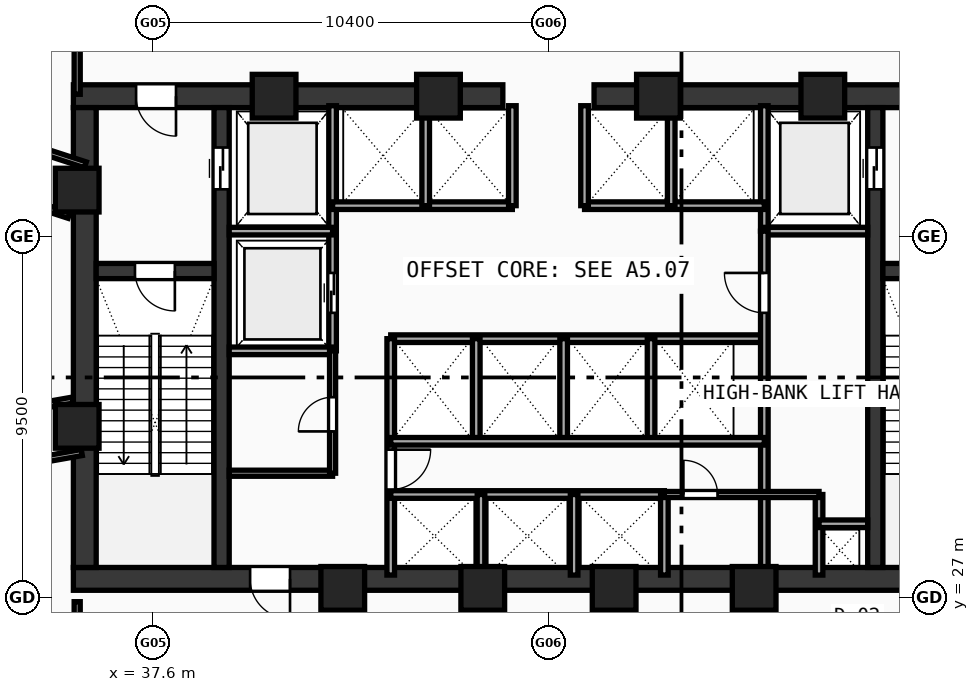
"""IFC4 building model, lengths in metres.
Left out: names, types, materials, properties, quantities, classifications, styles, units other than length and angle.
Written with IfcOpenShell. Run it as: python <this file> out.ifc"""

import sys

from ifc_helpers import new_model, si_unit, direction, frame, frame_2d, origin, origin_with_axes, origin_2d, place, context, subcontext, project, spatial, rectangle, hollow_rectangle, extrude, source, transform, mapped, element, fill, save


model = new_model("IFC4")
c1 = context("Model", 3, precision=1e-05, world=origin(), true_north=direction((0.0, 1.0)))
c2 = subcontext(c1, "Body", "Model", "MODEL_VIEW")
j1 = project(units=[si_unit("LENGTHUNIT", "METRE"), si_unit("PLANEANGLEUNIT", "RADIAN")], contexts=[c1])
p1 = place(None, origin())
s1 = spatial("IfcSite", under=j1, at=p1, CompositionType="ELEMENT")
p2 = place(p1, origin())
s2 = spatial("IfcBuilding", under=s1, at=p2, CompositionType="ELEMENT")
p3 = place(p2, frame((0.0, 0.0, 76.38)))
s3 = spatial("IfcBuildingStorey", under=s2, at=p3, CompositionType="ELEMENT", Elevation=76.38)
p4 = place(p3, frame((35.5, 27.5, 0.0), z_axis=(0.0, 0.0, 1.0), x_axis=(1.0, 0.0, 0.0)))
e1 = element("IfcWall", 1, at=p4, inside=s3, PredefinedType="SHEAR", context=c2, shape_type="SweptSolid", body=[
    extrude(rectangle(XDim=25.0, YDim=0.6, at=frame_2d((12.5, 0.0))), origin(), (0.0, 0.0, 1.0), 4.54),
])
p5 = place(p4, frame((4.65, 0.0, 0.0)))
e2 = element("IfcOpeningElement", 2, at=p5, cuts=e1, PredefinedType="OPENING", context=c2, shape_type="SweptSolid", body=[
    extrude(rectangle(XDim=1.05, YDim=2.1, at=frame_2d((0.525, 1.05))), frame((0.0, 0.31, 0.0), z_axis=(0.0, -1.0, 0.0), x_axis=(1.0, 0.0, 0.0)), (0.0, 0.0, 1.0), 0.62),
])
p6 = place(p3, frame((35.5, 40.2, 0.0), z_axis=(0.0, 0.0, 1.0), x_axis=(1.0, 0.0, 0.0)))
e3 = element("IfcWall", 3, at=p6, inside=s3, PredefinedType="SHEAR", context=c2, shape_type="SweptSolid", body=[
    extrude(rectangle(XDim=11.3, YDim=0.6, at=frame_2d((5.65, 0.0))), origin(), (0.0, 0.0, 1.0), 4.54),
])
p7 = place(p6, frame((1.65, 0.0, 0.0)))
e4 = element("IfcOpeningElement", 4, at=p7, cuts=e3, PredefinedType="OPENING", context=c2, shape_type="SweptSolid", body=[
    extrude(rectangle(XDim=1.05, YDim=2.1, at=frame_2d((0.525, 1.05))), frame((0.0, 0.31, 0.0), z_axis=(0.0, -1.0, 0.0), x_axis=(1.0, 0.0, 0.0)), (0.0, 0.0, 1.0), 0.62),
])
p8 = place(p3, frame((49.2, 40.2, 0.0), z_axis=(0.0, 0.0, 1.0), x_axis=(1.0, 0.0, 0.0)))
e5 = element("IfcWall", 5, at=p8, inside=s3, PredefinedType="SHEAR", context=c2, shape_type="SweptSolid", body=[
    extrude(rectangle(XDim=11.3, YDim=0.6, at=frame_2d((5.65, 0.0))), origin(), (0.0, 0.0, 1.0), 4.54),
])
p9 = place(p8, frame((8.6, 0.0, 0.0)))
e6 = element("IfcOpeningElement", 6, at=p9, cuts=e5, PredefinedType="OPENING", context=c2, shape_type="SweptSolid", body=[
    extrude(rectangle(XDim=1.05, YDim=2.1, at=frame_2d((0.525, 1.05))), frame((0.0, 0.31, 0.0), z_axis=(0.0, -1.0, 0.0), x_axis=(1.0, 0.0, 0.0)), (0.0, 0.0, 1.0), 0.62),
])
p10 = place(p3, frame((35.8, 27.8, 0.0), z_axis=(0.0, 0.0, 1.0), x_axis=(0.0, 1.0, 0.0)))
e7 = element("IfcWall", 7, at=p10, inside=s3, PredefinedType="SHEAR", context=c2, shape_type="SweptSolid", body=[
    extrude(rectangle(XDim=12.1, YDim=0.6, at=frame_2d((6.05, 0.0))), origin(), (0.0, 0.0, 1.0), 4.54),
])
p11 = place(p3, frame((39.4, 27.8, 0.0), z_axis=(0.0, 0.0, 1.0), x_axis=(0.0, 1.0, 0.0)))
e8 = element("IfcWall", 8, at=p11, inside=s3, PredefinedType="SHEAR", context=c2, shape_type="SweptSolid", body=[
    extrude(rectangle(XDim=12.1, YDim=0.4, at=frame_2d((6.05, 0.0))), origin(), (0.0, 0.0, 1.0), 4.54),
])
p12 = place(p11, frame((9.95, 0.0, 0.0)))
e9 = element("IfcOpeningElement", 9, at=p12, cuts=e8, PredefinedType="OPENING", context=c2, shape_type="SweptSolid", body=[
    extrude(rectangle(XDim=1.1, YDim=2.1, at=frame_2d((0.55, 1.05))), frame((0.0, 0.21, 0.0), z_axis=(0.0, -1.0, 0.0), x_axis=(1.0, 0.0, 0.0)), (0.0, 0.0, 1.0), 0.42),
])
p13 = place(p3, frame((56.6, 27.8, 0.0), z_axis=(0.0, 0.0, 1.0), x_axis=(0.0, 1.0, 0.0)))
e10 = element("IfcWall", 10, at=p13, inside=s3, PredefinedType="SHEAR", context=c2, shape_type="SweptSolid", body=[
    extrude(rectangle(XDim=12.1, YDim=0.4, at=frame_2d((6.05, 0.0))), origin(), (0.0, 0.0, 1.0), 4.54),
])
p14 = place(p13, frame((9.95, 0.0, 0.0)))
e11 = element("IfcOpeningElement", 11, at=p14, cuts=e10, PredefinedType="OPENING", context=c2, shape_type="SweptSolid", body=[
    extrude(rectangle(XDim=1.1, YDim=2.1, at=frame_2d((0.55, 1.05))), frame((0.0, 0.21, 0.0), z_axis=(0.0, -1.0, 0.0), x_axis=(1.0, 0.0, 0.0)), (0.0, 0.0, 1.0), 0.42),
])
p15 = place(p3, frame((36.1, 35.6, 0.0), z_axis=(0.0, 0.0, 1.0), x_axis=(1.0, 0.0, 0.0)))
e12 = element("IfcWall", 12, at=p15, inside=s3, PredefinedType="SHEAR", context=c2, shape_type="SweptSolid", body=[
    extrude(rectangle(XDim=3.1, YDim=0.4, at=frame_2d((1.55, 0.0))), origin(), (0.0, 0.0, 1.0), 4.54),
])
p16 = place(p15, frame((1.02, 0.0, 0.0)))
e13 = element("IfcOpeningElement", 13, at=p16, cuts=e12, PredefinedType="OPENING", context=c2, shape_type="SweptSolid", body=[
    extrude(rectangle(XDim=1.05, YDim=2.1, at=frame_2d((0.525, 1.05))), frame((0.0, 0.21, 0.0), z_axis=(0.0, -1.0, 0.0), x_axis=(1.0, 0.0, 0.0)), (0.0, 0.0, 1.0), 0.42),
])
p17 = place(p3, frame((56.8, 35.6, 0.0), z_axis=(0.0, 0.0, 1.0), x_axis=(1.0, 0.0, 0.0)))
e14 = element("IfcWall", 14, at=p17, inside=s3, PredefinedType="SHEAR", context=c2, shape_type="SweptSolid", body=[
    extrude(rectangle(XDim=3.1, YDim=0.4, at=frame_2d((1.55, 0.0))), origin(), (0.0, 0.0, 1.0), 4.54),
])
p18 = place(p17, frame((1.02, 0.0, 0.0)))
e15 = element("IfcOpeningElement", 15, at=p18, cuts=e14, PredefinedType="OPENING", context=c2, shape_type="SweptSolid", body=[
    extrude(rectangle(XDim=1.05, YDim=2.1, at=frame_2d((0.525, 1.05))), frame((0.0, 0.21, 0.0), z_axis=(0.0, -1.0, 0.0), x_axis=(1.0, 0.0, 0.0)), (0.0, 0.0, 1.0), 0.42),
])
m1 = source(origin(), c2, "Body", "SweptSolid", [
    extrude(hollow_rectangle(XDim=1.15, YDim=1.15, WallThickness=0.048, at=origin_2d()), origin(), (0.0, 0.0, 1.0), 4.82),
])
for number, where, z_axis, x_axis in (
    (16, (42.588, 27.25, -0.28), (0.0, 0.0, 1.0), (1.0, 0.0, 0.0)),
    (17, (46.272, 27.25, -0.28), (0.0, 0.0, 1.0), (1.0, 0.0, 0.0)),
    (18, (49.729, 27.25, -0.28), (0.0, 0.0, 1.0), (1.0, 0.0, 0.0)),
    (19, (53.412, 27.25, -0.28), (0.0, 0.0, 1.0), (1.0, 0.0, 0.0)),
    (20, (55.219, 40.2, -0.28), (0.0, 0.0, 1.0), (1.0, 0.0, 0.0)),
    (21, (50.894, 40.2, -0.28), (0.0, 0.0, 1.0), (1.0, 0.0, 0.0)),
    (22, (45.106, 40.2, -0.28), (0.0, 0.0, 1.0), (1.0, 0.0, 0.0)),
    (23, (40.781, 40.2, -0.28), (0.0, 0.0, 1.0), (1.0, 0.0, 0.0)),
    (24, (35.6, 37.729, -0.28), (0.0, 0.0, 1.0), (1.0, 0.0, 0.0)),
    (25, (35.6, 31.513, -0.28), (0.0, 0.0, 1.0), (1.0, 0.0, 0.0)),
):
    element("IfcColumn", number, at=place(p3, frame(where, z_axis=z_axis, x_axis=x_axis)), inside=s3, PredefinedType="COLUMN", context=c2, shape_type="MappedRepresentation", body=[
        mapped(m1, transform((0.0, 0.0, 0.0), scale=1.0)),
    ])
p19 = place(p3, frame((42.32, 33.5, 0.0), z_axis=(0.0, 0.0, 1.0), x_axis=(0.0, 1.0, 0.0)))
e26 = element("IfcWall", 26, at=p19, inside=s3, PredefinedType="SOLIDWALL", context=c2, shape_type="SweptSolid", body=[
    extrude(rectangle(XDim=6.45, YDim=0.2, at=frame_2d((3.225, 0.0))), origin(), (0.0, 0.0, 1.0), 4.54),
])
p20 = place(p19, frame((1.0, 0.0, 0.0)))
e27 = element("IfcOpeningElement", 27, at=p20, cuts=e26, PredefinedType="OPENING", context=c2, shape_type="SweptSolid", body=[
    extrude(rectangle(XDim=1.05, YDim=2.1, at=frame_2d((0.525, 1.05))), frame((0.0, 0.11, 0.0), z_axis=(0.0, -1.0, 0.0), x_axis=(1.0, 0.0, 0.0)), (0.0, 0.0, 1.0), 0.22),
])
for number, where, z_axis, x_axis in (
    (28, (39.6, 36.65, 0.0), (0.0, 0.0, 1.0), (1.0, 0.0, 0.0)),
    (29, (39.6, 33.5, 0.0), (0.0, 0.0, 1.0), (1.0, 0.0, 0.0)),
):
    element("IfcWall", number, at=place(p3, frame(where, z_axis=z_axis, x_axis=x_axis)), inside=s3, PredefinedType="SOLIDWALL", context=c2, shape_type="SweptSolid", body=[
        extrude(rectangle(XDim=2.72, YDim=0.2, at=frame_2d((1.36, 0.0))), origin(), (0.0, 0.0, 1.0), 4.54),
    ])
p21 = place(p3, frame((53.68, 36.65, 0.0), z_axis=(0.0, 0.0, 1.0), x_axis=(0.0, 1.0, 0.0)))
e30 = element("IfcWall", 30, at=p21, inside=s3, PredefinedType="SOLIDWALL", context=c2, shape_type="SweptSolid", body=[
    extrude(rectangle(XDim=3.3, YDim=0.2, at=frame_2d((1.65, 0.0))), origin(), (0.0, 0.0, 1.0), 4.54),
])
p22 = place(p3, frame((53.68, 36.65, 0.0), z_axis=(0.0, 0.0, 1.0), x_axis=(1.0, 0.0, 0.0)))
e31 = element("IfcWall", 31, at=p22, inside=s3, PredefinedType="SOLIDWALL", context=c2, shape_type="SweptSolid", body=[
    extrude(rectangle(XDim=2.72, YDim=0.2, at=frame_2d((1.36, 0.0))), origin(), (0.0, 0.0, 1.0), 4.54),
])
for number, where, z_axis, x_axis in (
    (32, (42.32, 37.32, 0.0), (0.0, 0.0, 1.0), (1.0, 0.0, 0.0)),
    (33, (48.95, 37.32, 0.0), (0.0, 0.0, 1.0), (1.0, 0.0, 0.0)),
):
    element("IfcWall", number, at=place(p3, frame(where, z_axis=z_axis, x_axis=x_axis)), inside=s3, PredefinedType="SOLIDWALL", context=c2, shape_type="SweptSolid", body=[
        extrude(rectangle(XDim=4.73, YDim=0.2, at=frame_2d((2.365, 0.0))), origin(), (0.0, 0.0, 1.0), 4.54),
    ])
for number, where, z_axis, x_axis in (
    (34, (47.05, 37.32, 0.0), (0.0, 0.0, 1.0), (0.0, 1.0, 0.0)),
    (35, (48.95, 37.32, 0.0), (0.0, 0.0, 1.0), (0.0, 1.0, 0.0)),
    (36, (44.77, 37.32, 0.0), (0.0, 0.0, 1.0), (0.0, 1.0, 0.0)),
    (37, (51.23, 37.32, 0.0), (0.0, 0.0, 1.0), (0.0, 1.0, 0.0)),
):
    element("IfcWall", number, at=place(p3, frame(where, z_axis=z_axis, x_axis=x_axis)), inside=s3, PredefinedType="SOLIDWALL", context=c2, shape_type="SweptSolid", body=[
        extrude(rectangle(XDim=2.63, YDim=0.2, at=frame_2d((1.315, 0.0))), origin(), (0.0, 0.0, 1.0), 4.54),
    ])
p23 = place(p3, frame((43.85, 33.82, 0.0), z_axis=(0.0, 0.0, 1.0), x_axis=(1.0, 0.0, 0.0)))
e38 = element("IfcWall", 38, at=p23, inside=s3, PredefinedType="SOLIDWALL", context=c2, shape_type="SweptSolid", body=[
    extrude(rectangle(XDim=9.83, YDim=0.2, at=frame_2d((4.915, 0.0))), origin(), (0.0, 0.0, 1.0), 4.54),
])
p24 = place(p3, frame((43.85, 27.6, 0.0), z_axis=(0.0, 0.0, 1.0), x_axis=(0.0, 1.0, 0.0)))
e39 = element("IfcWall", 39, at=p24, inside=s3, PredefinedType="SOLIDWALL", context=c2, shape_type="SweptSolid", body=[
    extrude(rectangle(XDim=6.22, YDim=0.2, at=frame_2d((3.11, 0.0))), origin(), (0.0, 0.0, 1.0), 4.54),
])
p25 = place(p24, frame((2.25, 0.0, 0.0)))
e40 = element("IfcOpeningElement", 40, at=p25, cuts=e39, PredefinedType="OPENING", context=c2, shape_type="SweptSolid", body=[
    extrude(rectangle(XDim=1.05, YDim=2.1, at=frame_2d((0.525, 1.05))), frame((0.0, 0.11, 0.0), z_axis=(0.0, -1.0, 0.0), x_axis=(1.0, 0.0, 0.0)), (0.0, 0.0, 1.0), 0.22),
])
p26 = place(p3, frame((53.68, 27.6, 0.0), z_axis=(0.0, 0.0, 1.0), x_axis=(0.0, 1.0, 0.0)))
e41 = element("IfcWall", 41, at=p26, inside=s3, PredefinedType="SOLIDWALL", context=c2, shape_type="SweptSolid", body=[
    extrude(rectangle(XDim=9.05, YDim=0.2, at=frame_2d((4.525, 0.0))), origin(), (0.0, 0.0, 1.0), 4.54),
])
p27 = place(p26, frame((6.9, 0.0, 0.0)))
e42 = element("IfcOpeningElement", 42, at=p27, cuts=e41, PredefinedType="OPENING", context=c2, shape_type="SweptSolid", body=[
    extrude(rectangle(XDim=1.05, YDim=2.1, at=frame_2d((0.525, 1.05))), frame((0.0, 0.11, 0.0), z_axis=(0.0, -1.0, 0.0), x_axis=(1.0, 0.0, 0.0)), (0.0, 0.0, 1.0), 0.22),
])
for number, where, z_axis, x_axis in (
    (43, (46.1, 31.12, 0.0), (0.0, 0.0, 1.0), (0.0, 1.0, 0.0)),
    (44, (48.4, 31.12, 0.0), (0.0, 0.0, 1.0), (0.0, 1.0, 0.0)),
    (45, (50.7, 31.12, 0.0), (0.0, 0.0, 1.0), (0.0, 1.0, 0.0)),
):
    element("IfcWall", number, at=place(p3, frame(where, z_axis=z_axis, x_axis=x_axis)), inside=s3, PredefinedType="SOLIDWALL", context=c2, shape_type="SweptSolid", body=[
        extrude(rectangle(XDim=2.7, YDim=0.2, at=frame_2d((1.35, 0.0))), origin(), (0.0, 0.0, 1.0), 4.54),
    ])
p28 = place(p3, frame((43.85, 29.72, 0.0), z_axis=(0.0, 0.0, 1.0), x_axis=(1.0, 0.0, 0.0)))
e46 = element("IfcWall", 46, at=p28, inside=s3, PredefinedType="SOLIDWALL", context=c2, shape_type="SweptSolid", body=[
    extrude(rectangle(XDim=7.2, YDim=0.2, at=frame_2d((3.6, 0.0))), origin(), (0.0, 0.0, 1.0), 4.54),
])
p29 = place(p3, frame((51.05, 27.6, 0.0), z_axis=(0.0, 0.0, 1.0), x_axis=(0.0, 1.0, 0.0)))
e47 = element("IfcWall", 47, at=p29, inside=s3, PredefinedType="SOLIDWALL", context=c2, shape_type="SweptSolid", body=[
    extrude(rectangle(XDim=2.12, YDim=0.2, at=frame_2d((1.06, 0.0))), origin(), (0.0, 0.0, 1.0), 4.54),
])
p30 = place(p3, frame((43.85, 31.12, 0.0), z_axis=(0.0, 0.0, 1.0), x_axis=(1.0, 0.0, 0.0)))
e48 = element("IfcWall", 48, at=p30, inside=s3, PredefinedType="SOLIDWALL", context=c2, shape_type="SweptSolid", body=[
    extrude(rectangle(XDim=9.83, YDim=0.2, at=frame_2d((4.915, 0.0))), origin(), (0.0, 0.0, 1.0), 4.54),
])
for number, where, z_axis, x_axis in (
    (49, (46.225, 27.6, 0.0), (0.0, 0.0, 1.0), (0.0, 1.0, 0.0)),
    (50, (48.675, 27.6, 0.0), (0.0, 0.0, 1.0), (0.0, 1.0, 0.0)),
    (51, (55.12, 27.6, 0.0), (0.0, 0.0, 1.0), (0.0, 1.0, 0.0)),
):
    element("IfcWall", number, at=place(p3, frame(where, z_axis=z_axis, x_axis=x_axis)), inside=s3, PredefinedType="SOLIDWALL", context=c2, shape_type="SweptSolid", body=[
        extrude(rectangle(XDim=2.12, YDim=0.2, at=frame_2d((1.06, 0.0))), origin(), (0.0, 0.0, 1.0), 4.54),
    ])
p31 = place(p3, frame((55.12, 28.95, 0.0), z_axis=(0.0, 0.0, 1.0), x_axis=(1.0, 0.0, 0.0)))
e52 = element("IfcWall", 52, at=p31, inside=s3, PredefinedType="SOLIDWALL", context=c2, shape_type="SweptSolid", body=[
    extrude(rectangle(XDim=1.28, YDim=0.2, at=frame_2d((0.64, 0.0))), origin(), (0.0, 0.0, 1.0), 4.54),
])
p32 = place(p3, frame((39.6, 30.28, 0.0), z_axis=(0.0, 0.0, 1.0), x_axis=(1.0, 0.0, 0.0)))
e53 = element("IfcWall", 53, at=p32, inside=s3, PredefinedType="PARTITIONING", context=c2, shape_type="SweptSolid", body=[
    extrude(rectangle(XDim=2.72, YDim=0.16, at=frame_2d((1.36, 0.0))), origin(), (0.0, 0.0, 1.0), 4.54),
])
p33 = place(p3, frame((42.32, 30.28, 0.0), z_axis=(0.0, 0.0, 1.0), x_axis=(0.0, 1.0, 0.0)))
e54 = element("IfcWall", 54, at=p33, inside=s3, PredefinedType="PARTITIONING", context=c2, shape_type="SweptSolid", body=[
    extrude(rectangle(XDim=3.22, YDim=0.16, at=frame_2d((1.61, 0.0))), origin(), (0.0, 0.0, 1.0), 4.54),
])
p34 = place(p33, frame((1.1, 0.0, 0.0)))
e55 = element("IfcOpeningElement", 55, at=p34, cuts=e54, PredefinedType="OPENING", context=c2, shape_type="SweptSolid", body=[
    extrude(rectangle(XDim=0.9, YDim=2.1, at=frame_2d((0.45, 1.05))), frame((0.0, 0.09, 0.0), z_axis=(0.0, -1.0, 0.0), x_axis=(1.0, 0.0, 0.0)), (0.0, 0.0, 1.0), 0.18),
])
p35 = place(p3, frame((51.05, 29.72, 0.0), z_axis=(0.0, 0.0, 1.0), x_axis=(1.0, 0.0, 0.0)))
e56 = element("IfcWall", 56, at=p35, inside=s3, PredefinedType="PARTITIONING", context=c2, shape_type="SweptSolid", body=[
    extrude(rectangle(XDim=4.07, YDim=0.16, at=frame_2d((2.035, 0.0))), origin(), (0.0, 0.0, 1.0), 4.54),
])
p36 = place(p35, frame((0.5, 0.0, 0.0)))
e57 = element("IfcOpeningElement", 57, at=p36, cuts=e56, PredefinedType="OPENING", context=c2, shape_type="SweptSolid", body=[
    extrude(rectangle(XDim=0.9, YDim=2.1, at=frame_2d((0.45, 1.05))), frame((0.0, 0.09, 0.0), z_axis=(0.0, -1.0, 0.0), x_axis=(1.0, 0.0, 0.0)), (0.0, 0.0, 1.0), 0.18),
])
p37 = place(p3, frame((35.816, 38.395, 0.0), z_axis=(0.0, 0.0, 1.0), x_axis=(-0.951057789573, 0.309013075603, 0.0)))
e58 = element("IfcWall", 58, at=p37, inside=s3, PredefinedType="PARTITIONING", context=c2, shape_type="SweptSolid", body=[
    extrude(rectangle(XDim=21.478, YDim=0.16, at=frame_2d((10.739, 0.0))), origin(), (0.0, 0.0, 1.0), 3.84),
])
p38 = place(p3, frame((35.384, 37.063, 0.0), z_axis=(0.0, 0.0, 1.0), x_axis=(-0.951055634406, 0.309019708539, 0.0)))
e59 = element("IfcWall", 59, at=p38, inside=s3, PredefinedType="PARTITIONING", context=c2, shape_type="SweptSolid", body=[
    extrude(rectangle(XDim=21.711, YDim=0.16, at=frame_2d((10.856, 0.0))), origin(), (0.0, 0.0, 1.0), 3.84),
])
p39 = place(p3, frame((35.479, 32.203, 0.0), z_axis=(0.0, 0.0, 1.0), x_axis=(-0.984808219267, -0.173645533386, 0.0)))
e60 = element("IfcWall", 60, at=p39, inside=s3, PredefinedType="PARTITIONING", context=c2, shape_type="SweptSolid", body=[
    extrude(rectangle(XDim=28.194, YDim=0.16, at=frame_2d((14.097, 0.0))), origin(), (0.0, 0.0, 1.0), 3.84),
])
p40 = place(p3, frame((35.722, 30.824, 0.0), z_axis=(0.0, 0.0, 1.0), x_axis=(-0.984807902687, -0.173647328815, 0.0)))
e61 = element("IfcWall", 61, at=p40, inside=s3, PredefinedType="PARTITIONING", context=c2, shape_type="SweptSolid", body=[
    extrude(rectangle(XDim=29.065, YDim=0.16, at=frame_2d((14.533, 0.0))), origin(), (0.0, 0.0, 1.0), 3.84),
])
p41 = place(p3, frame((35.6, 40.25, 0.0), z_axis=(0.0, 0.0, 1.0), x_axis=(0.0, 1.0, 0.0)))
e62 = element("IfcWall", 62, at=p41, inside=s3, PredefinedType="PARTITIONING", context=c2, shape_type="SweptSolid", body=[
    extrude(rectangle(XDim=2.55, YDim=0.16, at=frame_2d((1.275, 0.0))), origin(), (0.0, 0.0, 1.0), 4.54),
])
p42 = place(p3, frame((35.6, 24.9, 0.0), z_axis=(0.0, 0.0, 1.0), x_axis=(0.0, 1.0, 0.0)))
e63 = element("IfcWall", 63, at=p42, inside=s3, PredefinedType="PARTITIONING", context=c2, shape_type="SweptSolid", body=[
    extrude(rectangle(XDim=2.0, YDim=0.16, at=frame_2d((1.0, 0.0))), origin(), (0.0, 0.0, 1.0), 4.54),
])
m2 = source(origin(), c2, "Body", "SweptSolid", [
    extrude(rectangle(XDim=1.05, YDim=2.1, at=frame_2d((0.525, 1.05))), frame((0.0, 0.025, 0.0), z_axis=(0.0, -1.0, 0.0), x_axis=(1.0, 0.0, 0.0)), (0.0, 0.0, 1.0), 0.05),
])
p43 = place(p16, frame((1.05, 0.0, 0.0), z_axis=(0.0, 0.0, 1.0), x_axis=(-1.0, 0.0, 0.0)))
e64 = element("IfcDoor", 64, at=p43, inside=s3, OperationType="SINGLE_SWING_LEFT", PredefinedType="DOOR", context=c2, shape_type="MappedRepresentation", body=[
    mapped(m2, transform((0.0, 0.0, 0.0), scale=1.0)),
])
fill(e13, e64)
p44 = place(p7, frame((1.05, 0.0, 0.0), z_axis=(0.0, 0.0, 1.0), x_axis=(-1.0, 0.0, 0.0)))
e65 = element("IfcDoor", 65, at=p44, inside=s3, OperationType="SINGLE_SWING_LEFT", PredefinedType="DOOR", context=c2, shape_type="MappedRepresentation", body=[
    mapped(m2, transform((0.0, 0.0, 0.0), scale=1.0)),
])
fill(e4, e65)
p45 = place(p5, frame((1.05, 0.0, 0.0), z_axis=(0.0, 0.0, 1.0), x_axis=(-1.0, 0.0, 0.0)))
e66 = element("IfcDoor", 66, at=p45, inside=s3, OperationType="SINGLE_SWING_LEFT", PredefinedType="DOOR", context=c2, shape_type="MappedRepresentation", body=[
    mapped(m2, transform((0.0, 0.0, 0.0), scale=1.0)),
])
fill(e2, e66)
m3 = source(origin(), c2, "Body", "SweptSolid", [
    extrude(rectangle(XDim=1.1, YDim=2.1, at=frame_2d((0.55, 1.05))), frame((0.0, 0.025, 0.0), z_axis=(0.0, -1.0, 0.0), x_axis=(1.0, 0.0, 0.0)), (0.0, 0.0, 1.0), 0.05),
])
p46 = place(p12, frame((1.1, 0.0, 0.0), z_axis=(0.0, 0.0, 1.0), x_axis=(-1.0, 0.0, 0.0)))
e67 = element("IfcDoor", 67, at=p46, inside=s3, OperationType="DOUBLE_DOOR_SLIDING", PredefinedType="DOOR", context=c2, shape_type="MappedRepresentation", body=[
    mapped(m3, transform((0.0, 0.0, 0.0), scale=1.0)),
])
fill(e9, e67)
p47 = place(p14, origin_with_axes())
e68 = element("IfcDoor", 68, at=p47, inside=s3, OperationType="DOUBLE_DOOR_SLIDING", PredefinedType="DOOR", context=c2, shape_type="MappedRepresentation", body=[
    mapped(m3, transform((0.0, 0.0, 0.0), scale=1.0)),
])
fill(e11, e68)
p48 = place(p20, origin_with_axes())
e69 = element("IfcDoor", 69, at=p48, inside=s3, OperationType="DOUBLE_DOOR_SLIDING", PredefinedType="DOOR", context=c2, shape_type="MappedRepresentation", body=[
    mapped(m2, transform((0.0, 0.0, 0.0), scale=1.0)),
])
fill(e27, e69)
p49 = place(p25, frame((1.05, 0.0, 0.0), z_axis=(0.0, 0.0, 1.0), x_axis=(-1.0, 0.0, 0.0)))
e70 = element("IfcDoor", 70, at=p49, inside=s3, OperationType="SINGLE_SWING_LEFT", PredefinedType="DOOR", context=c2, shape_type="MappedRepresentation", body=[
    mapped(m2, transform((0.0, 0.0, 0.0), scale=1.0)),
])
fill(e40, e70)
p50 = place(p27, origin_with_axes())
e71 = element("IfcDoor", 71, at=p50, inside=s3, OperationType="SINGLE_SWING_RIGHT", PredefinedType="DOOR", context=c2, shape_type="MappedRepresentation", body=[
    mapped(m2, transform((0.0, 0.0, 0.0), scale=1.0)),
])
fill(e42, e71)
m4 = source(origin(), c2, "Body", "SweptSolid", [
    extrude(rectangle(XDim=0.9, YDim=2.1, at=frame_2d((0.45, 1.05))), frame((0.0, 0.025, 0.0), z_axis=(0.0, -1.0, 0.0), x_axis=(1.0, 0.0, 0.0)), (0.0, 0.0, 1.0), 0.05),
])
p51 = place(p34, origin_with_axes())
e72 = element("IfcDoor", 72, at=p51, inside=s3, OperationType="SINGLE_SWING_LEFT", PredefinedType="DOOR", context=c2, shape_type="MappedRepresentation", body=[
    mapped(m4, transform((0.0, 0.0, 0.0), scale=1.0)),
])
fill(e55, e72)
p52 = place(p36, origin_with_axes())
e73 = element("IfcDoor", 73, at=p52, inside=s3, OperationType="SINGLE_SWING_LEFT", PredefinedType="DOOR", context=c2, shape_type="MappedRepresentation", body=[
    mapped(m4, transform((0.0, 0.0, 0.0), scale=1.0)),
])
fill(e57, e73)
save(model, sys.argv[1])
